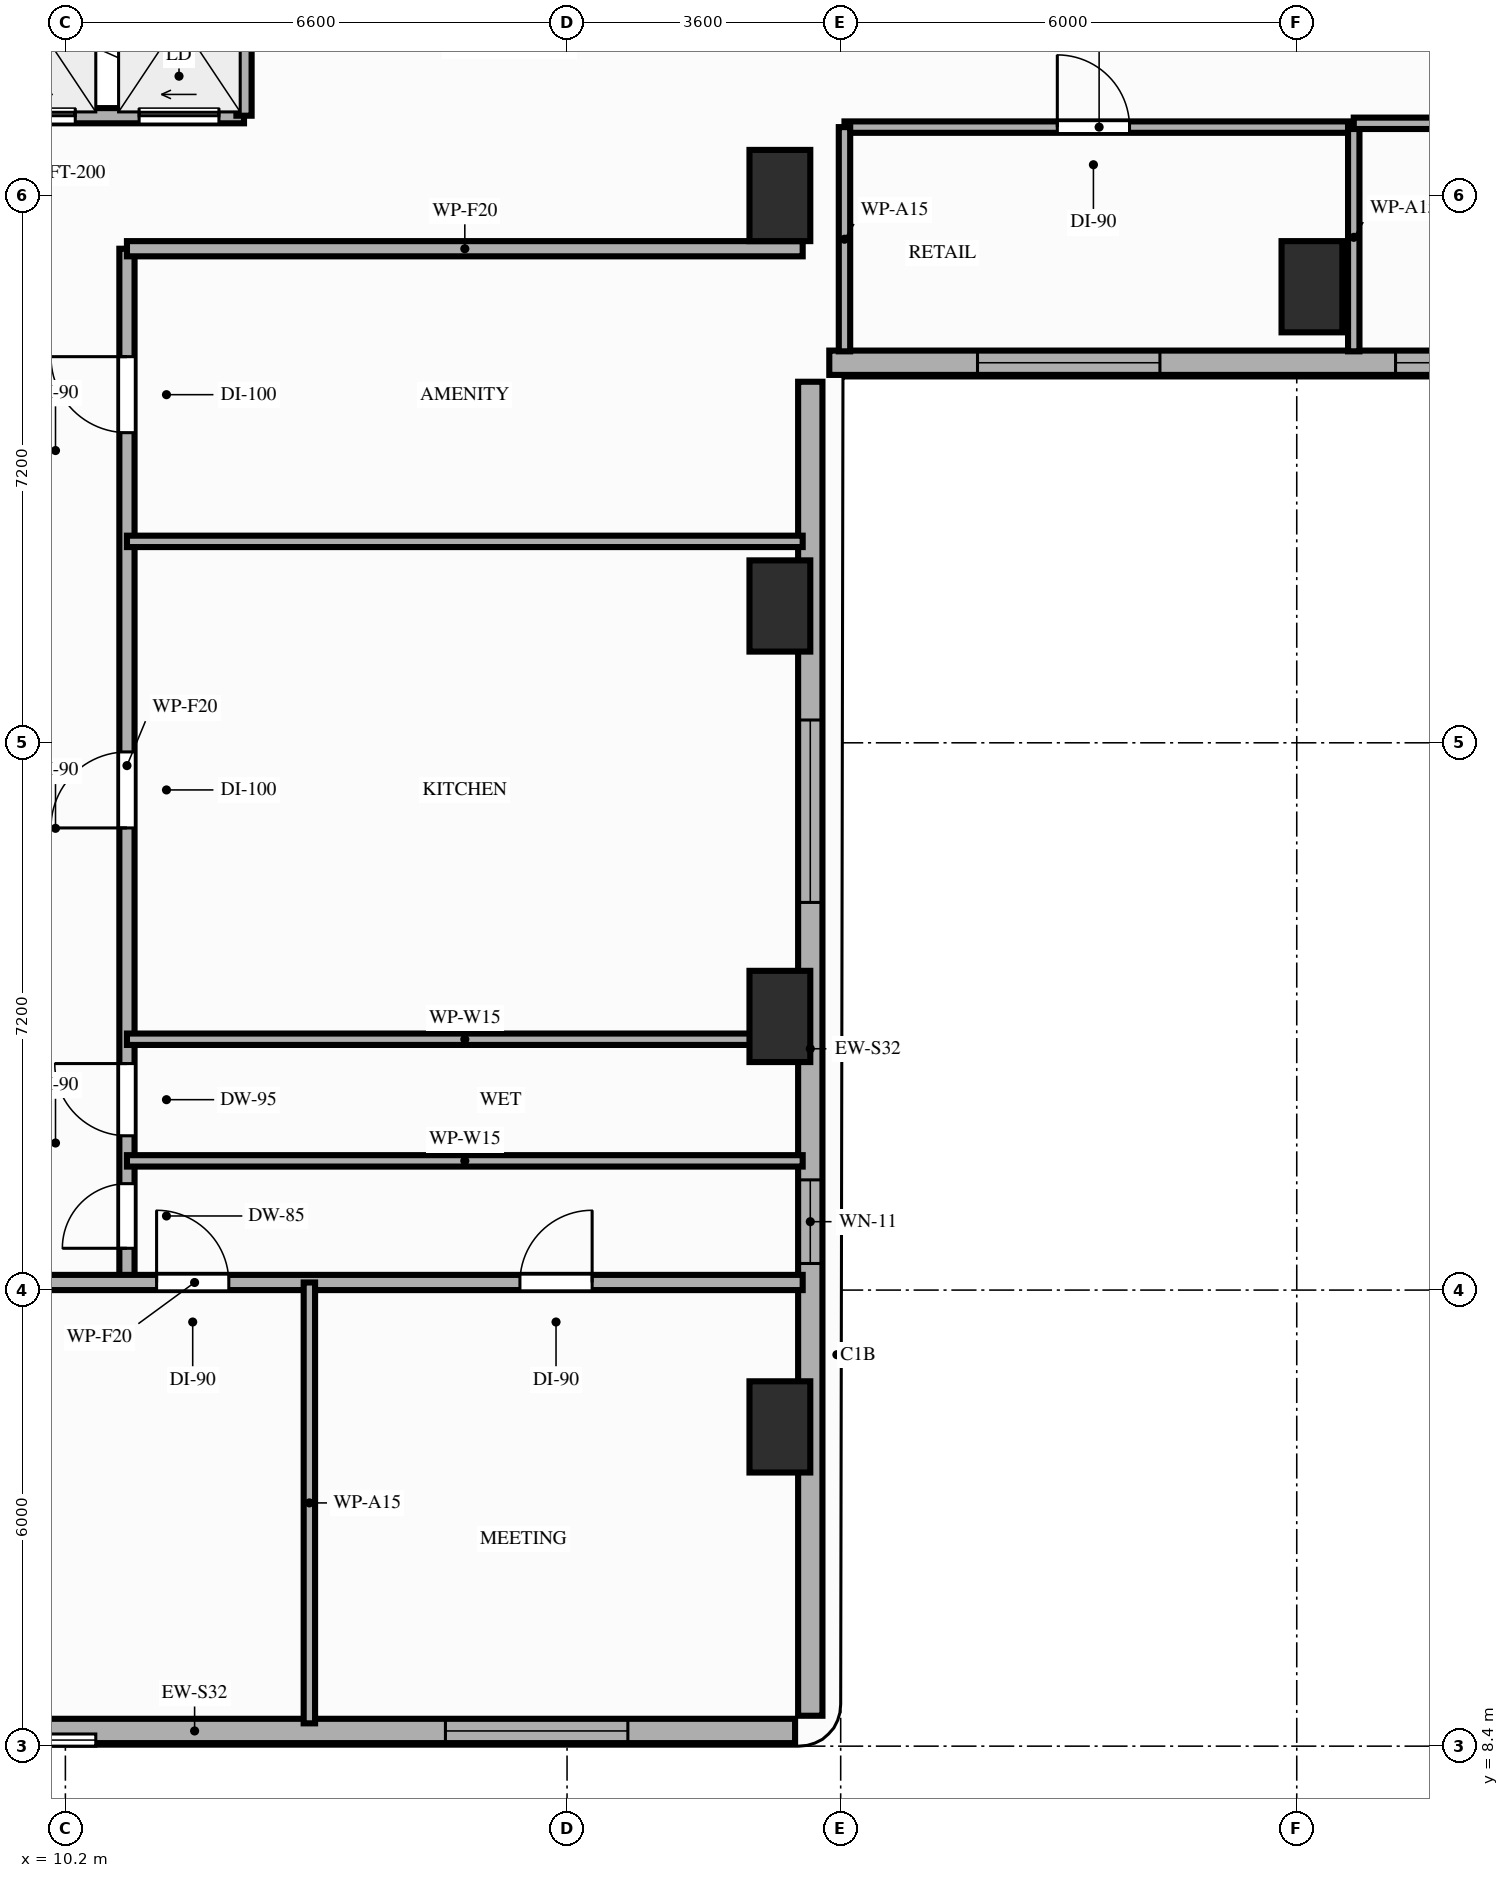
"""IFC4 building model, lengths in metres.
Left out: names, types, materials, properties, quantities, classifications, styles, units other than length and angle.
Written with IfcOpenShell. Run it as: python <this file> out.ifc"""

import sys

from ifc_helpers import new_model, si_unit, direction, frame, frame_2d, origin, origin_2d, place, context, subcontext, project, spatial, rectangle, extrude, element, fill, save


model = new_model("IFC4")
c1 = context("Model", 3, precision=1e-05, world=origin(), true_north=direction((0.0, 1.0)))
c2 = subcontext(c1, "Body", "Model", "MODEL_VIEW")
j1 = project(units=[si_unit("LENGTHUNIT", "METRE"), si_unit("PLANEANGLEUNIT", "RADIAN")], contexts=[c1])
p1 = place(None, origin())
s1 = spatial("IfcSite", under=j1, at=p1, CompositionType="ELEMENT")
p2 = place(p1, origin())
s2 = spatial("IfcBuilding", under=s1, at=p2, CompositionType="ELEMENT")
p3 = place(p2, frame((0.0, 0.0, 75.6)))
s3 = spatial("IfcBuildingStorey", under=s2, at=p3, CompositionType="ELEMENT", Elevation=75.6)
for number, where, z_axis, x_axis in (
    (1, (19.6, 12.6, 0.0), (0.0, 0.0, 1.0), (1.0, 0.0, 0.0)),
    (2, (19.6, 18.0, 0.0), (0.0, 0.0, 1.0), (1.0, 0.0, 0.0)),
    (3, (19.6, 23.4, 0.0), (0.0, 0.0, 1.0), (1.0, 0.0, 0.0)),
    (4, (19.6, 28.8, 0.0), (0.0, 0.0, 1.0), (1.0, 0.0, 0.0)),
    (5, (26.6, 27.6, 0.0), (0.0, 0.0, 1.0), (1.0, 0.0, 0.0)),
):
    element("IfcColumn", number, at=place(p3, frame(where, z_axis=z_axis, x_axis=x_axis)), inside=s3, PredefinedType="COLUMN", context=c2, shape_type="SweptSolid", body=[
        extrude(rectangle(XDim=0.8, YDim=1.2, at=origin_2d()), origin(), (0.0, 0.0, 1.0), 3.8),
    ])
p4 = place(p3, frame((4.0, 8.6, 0.0), z_axis=(0.0, 0.0, 1.0), x_axis=(1.0, 0.0, 0.0)))
e6 = element("IfcWall", 6, at=p4, inside=s3, PredefinedType="STANDARD", context=c2, shape_type="SweptSolid", body=[
    extrude(rectangle(XDim=15.8, YDim=0.32, at=frame_2d((7.9, 0.0))), origin(), (0.0, 0.0, 1.0), 3.56),
])
p5 = place(p4, frame((11.2, 0.0, 0.85)))
e7 = element("IfcOpeningElement", 7, at=p5, cuts=e6, PredefinedType="OPENING", context=c2, shape_type="SweptSolid", body=[
    extrude(rectangle(XDim=2.4, YDim=1.8, at=frame_2d((1.2, 0.9))), frame((0.0, 0.17, 0.0), z_axis=(0.0, -1.0, 0.0), x_axis=(1.0, 0.0, 0.0)), (0.0, 0.0, 1.0), 0.34),
])
p6 = place(p3, frame((20.0, 8.8, 0.0), z_axis=(0.0, 0.0, 1.0), x_axis=(0.0, 1.0, 0.0)))
e8 = element("IfcWall", 8, at=p6, inside=s3, PredefinedType="STANDARD", context=c2, shape_type="SweptSolid", body=[
    extrude(rectangle(XDim=17.55, YDim=0.32, at=frame_2d((8.775, 0.0))), origin(), (0.0, 0.0, 1.0), 2.95),
])
p7 = place(p6, frame((5.95, 0.0, 0.85)))
e9 = element("IfcOpeningElement", 9, at=p7, cuts=e8, PredefinedType="OPENING", context=c2, shape_type="SweptSolid", body=[
    extrude(rectangle(XDim=1.1, YDim=1.7, at=frame_2d((0.55, 0.85))), frame((0.0, 0.17, 0.0), z_axis=(0.0, -1.0, 0.0), x_axis=(1.0, 0.0, 0.0)), (0.0, 0.0, 1.0), 0.34),
])
p8 = place(p6, frame((10.7, 0.0, 0.85)))
e10 = element("IfcOpeningElement", 10, at=p8, cuts=e8, PredefinedType="OPENING", context=c2, shape_type="SweptSolid", body=[
    extrude(rectangle(XDim=2.4, YDim=1.8, at=frame_2d((1.2, 0.9))), frame((0.0, 0.17, 0.0), z_axis=(0.0, -1.0, 0.0), x_axis=(1.0, 0.0, 0.0)), (0.0, 0.0, 1.0), 0.34),
])
p9 = place(p3, frame((20.25, 26.6, 0.0), z_axis=(0.0, 0.0, 1.0), x_axis=(1.0, 0.0, 0.0)))
e11 = element("IfcWall", 11, at=p9, inside=s3, PredefinedType="STANDARD", context=c2, shape_type="SweptSolid", body=[
    extrude(rectangle(XDim=26.15, YDim=0.32, at=frame_2d((13.075, 0.0))), origin(), (0.0, 0.0, 1.0), 3.56),
])
p10 = place(p9, frame((1.95, 0.0, 0.85)))
e12 = element("IfcOpeningElement", 12, at=p10, cuts=e11, PredefinedType="OPENING", context=c2, shape_type="SweptSolid", body=[
    extrude(rectangle(XDim=2.4, YDim=1.8, at=frame_2d((1.2, 0.9))), frame((0.0, 0.17, 0.0), z_axis=(0.0, -1.0, 0.0), x_axis=(1.0, 0.0, 0.0)), (0.0, 0.0, 1.0), 0.34),
])
p11 = place(p9, frame((7.45, 0.0, 0.85)))
e13 = element("IfcOpeningElement", 13, at=p11, cuts=e11, PredefinedType="OPENING", context=c2, shape_type="SweptSolid", body=[
    extrude(rectangle(XDim=2.4, YDim=1.8, at=frame_2d((1.2, 0.9))), frame((0.0, 0.17, 0.0), z_axis=(0.0, -1.0, 0.0), x_axis=(1.0, 0.0, 0.0)), (0.0, 0.0, 1.0), 0.34),
])
p12 = place(p9, frame((21.95, 0.0, 0.85)))
e14 = element("IfcOpeningElement", 14, at=p12, cuts=e11, PredefinedType="OPENING", context=c2, shape_type="SweptSolid", body=[
    extrude(rectangle(XDim=2.4, YDim=1.8, at=frame_2d((1.2, 0.9))), frame((0.0, 0.17, 0.0), z_axis=(0.0, -1.0, 0.0), x_axis=(1.0, 0.0, 0.0)), (0.0, 0.0, 1.0), 0.34),
])
p13 = place(p3, frame((7.0, 29.85, 0.0), z_axis=(0.0, 0.0, 1.0), x_axis=(1.0, 0.0, 0.0)))
e15 = element("IfcWall", 15, at=p13, inside=s3, PredefinedType="MOVABLE", context=c2, shape_type="SweptSolid", body=[
    extrude(rectangle(XDim=5.55, YDim=0.2, at=frame_2d((2.775, 0.0))), origin(), (0.0, 0.0, 1.0), 3.56),
])
p14 = place(p13, frame((0.38, 0.0, 0.0)))
e16 = element("IfcOpeningElement", 16, at=p14, cuts=e15, PredefinedType="OPENING", context=c2, shape_type="SweptSolid", body=[
    extrude(rectangle(XDim=1.05, YDim=2.15, at=frame_2d((0.525, 1.075))), frame((0.0, 0.11, 0.0), z_axis=(0.0, -1.0, 0.0), x_axis=(1.0, 0.0, 0.0)), (0.0, 0.0, 1.0), 0.22),
])
p15 = place(p13, frame((2.28, 0.0, 0.0)))
e17 = element("IfcOpeningElement", 17, at=p15, cuts=e15, PredefinedType="OPENING", context=c2, shape_type="SweptSolid", body=[
    extrude(rectangle(XDim=1.05, YDim=2.15, at=frame_2d((0.525, 1.075))), frame((0.0, 0.11, 0.0), z_axis=(0.0, -1.0, 0.0), x_axis=(1.0, 0.0, 0.0)), (0.0, 0.0, 1.0), 0.22),
])
p16 = place(p13, frame((4.17, 0.0, 0.0)))
e18 = element("IfcOpeningElement", 18, at=p16, cuts=e15, PredefinedType="OPENING", context=c2, shape_type="SweptSolid", body=[
    extrude(rectangle(XDim=1.05, YDim=2.15, at=frame_2d((0.525, 1.075))), frame((0.0, 0.11, 0.0), z_axis=(0.0, -1.0, 0.0), x_axis=(1.0, 0.0, 0.0)), (0.0, 0.0, 1.0), 0.22),
])
p17 = place(p3, frame((12.55, 29.85, 0.0), z_axis=(0.0, 0.0, 1.0), x_axis=(0.0, 1.0, 0.0)))
e19 = element("IfcWall", 19, at=p17, inside=s3, PredefinedType="MOVABLE", context=c2, shape_type="SweptSolid", body=[
    extrude(rectangle(XDim=2.5, YDim=0.2, at=frame_2d((1.25, 0.0))), origin(), (0.0, 0.0, 1.0), 3.56),
])
p18 = place(p3, frame((11.01, 14.5, 0.0), z_axis=(0.0, 0.0, 1.0), x_axis=(0.0, 1.0, 0.0)))
e20 = element("IfcWall", 20, at=p18, inside=s3, PredefinedType="PARTITIONING", context=c2, shape_type="SweptSolid", body=[
    extrude(rectangle(XDim=13.6, YDim=0.2, at=frame_2d((6.8, 0.0))), origin(), (0.0, 0.0, 1.0), 2.95),
])
p19 = place(p18, frame((0.45, 0.0, 0.0)))
e21 = element("IfcOpeningElement", 21, at=p19, cuts=e20, PredefinedType="OPENING", context=c2, shape_type="SweptSolid", body=[
    extrude(rectangle(XDim=0.85, YDim=2.1, at=frame_2d((0.425, 1.05))), frame((0.0, 0.11, 0.0), z_axis=(0.0, -1.0, 0.0), x_axis=(1.0, 0.0, 0.0)), (0.0, 0.0, 1.0), 0.22),
])
p20 = place(p18, frame((1.93, 0.0, 0.0)))
e22 = element("IfcOpeningElement", 22, at=p20, cuts=e20, PredefinedType="OPENING", context=c2, shape_type="SweptSolid", body=[
    extrude(rectangle(XDim=0.95, YDim=2.1, at=frame_2d((0.475, 1.05))), frame((0.0, 0.11, 0.0), z_axis=(0.0, -1.0, 0.0), x_axis=(1.0, 0.0, 0.0)), (0.0, 0.0, 1.0), 0.22),
])
p21 = place(p18, frame((5.98, 0.0, 0.0)))
e23 = element("IfcOpeningElement", 23, at=p21, cuts=e20, PredefinedType="OPENING", context=c2, shape_type="SweptSolid", body=[
    extrude(rectangle(XDim=1.0, YDim=2.15, at=frame_2d((0.5, 1.075))), frame((0.0, 0.11, 0.0), z_axis=(0.0, -1.0, 0.0), x_axis=(1.0, 0.0, 0.0)), (0.0, 0.0, 1.0), 0.22),
])
p22 = place(p18, frame((11.18, 0.0, 0.0)))
e24 = element("IfcOpeningElement", 24, at=p22, cuts=e20, PredefinedType="OPENING", context=c2, shape_type="SweptSolid", body=[
    extrude(rectangle(XDim=1.0, YDim=2.15, at=frame_2d((0.5, 1.075))), frame((0.0, 0.11, 0.0), z_axis=(0.0, -1.0, 0.0), x_axis=(1.0, 0.0, 0.0)), (0.0, 0.0, 1.0), 0.22),
])
p23 = place(p3, frame((3.9, 14.5, 0.0), z_axis=(0.0, 0.0, 1.0), x_axis=(1.0, 0.0, 0.0)))
e25 = element("IfcWall", 25, at=p23, inside=s3, PredefinedType="PARTITIONING", context=c2, shape_type="SweptSolid", body=[
    extrude(rectangle(XDim=16.0, YDim=0.2, at=frame_2d((8.0, 0.0))), origin(), (0.0, 0.0, 1.0), 2.95),
])
p24 = place(p23, frame((7.5, 0.0, 0.0)))
e26 = element("IfcOpeningElement", 26, at=p24, cuts=e25, PredefinedType="OPENING", context=c2, shape_type="SweptSolid", body=[
    extrude(rectangle(XDim=0.95, YDim=2.15, at=frame_2d((0.475, 1.075))), frame((0.0, 0.11, 0.0), z_axis=(0.0, -1.0, 0.0), x_axis=(1.0, 0.0, 0.0)), (0.0, 0.0, 1.0), 0.22),
])
p25 = place(p23, frame((12.28, 0.0, 0.0)))
e27 = element("IfcOpeningElement", 27, at=p25, cuts=e25, PredefinedType="OPENING", context=c2, shape_type="SweptSolid", body=[
    extrude(rectangle(XDim=0.95, YDim=2.15, at=frame_2d((0.475, 1.075))), frame((0.0, 0.11, 0.0), z_axis=(0.0, -1.0, 0.0), x_axis=(1.0, 0.0, 0.0)), (0.0, 0.0, 1.0), 0.22),
])
p26 = place(p3, frame((11.01, 28.1, 0.0), z_axis=(0.0, 0.0, 1.0), x_axis=(1.0, 0.0, 0.0)))
e28 = element("IfcWall", 28, at=p26, inside=s3, PredefinedType="PARTITIONING", context=c2, shape_type="SweptSolid", body=[
    extrude(rectangle(XDim=8.89, YDim=0.2, at=frame_2d((4.445, 0.0))), origin(), (0.0, 0.0, 1.0), 2.95),
])
p27 = place(p3, frame((20.45, 29.7, 0.0), z_axis=(0.0, 0.0, 1.0), x_axis=(1.0, 0.0, 0.0)))
e29 = element("IfcWall", 29, at=p27, inside=s3, PredefinedType="PARTITIONING", context=c2, shape_type="SweptSolid", body=[
    extrude(rectangle(XDim=6.7, YDim=0.15, at=frame_2d((3.35, 0.0))), origin(), (0.0, 0.0, 1.0), 3.56),
])
p28 = place(p27, frame((2.8, 0.0, 0.0)))
e30 = element("IfcOpeningElement", 30, at=p28, cuts=e29, PredefinedType="OPENING", context=c2, shape_type="SweptSolid", body=[
    extrude(rectangle(XDim=0.95, YDim=2.15, at=frame_2d((0.475, 1.075))), frame((0.0, 0.085, 0.0), z_axis=(0.0, -1.0, 0.0), x_axis=(1.0, 0.0, 0.0)), (0.0, 0.0, 1.0), 0.17),
])
p29 = place(p3, frame((20.45, 26.75, 0.0), z_axis=(0.0, 0.0, 1.0), x_axis=(0.0, 1.0, 0.0)))
e31 = element("IfcWall", 31, at=p29, inside=s3, PredefinedType="PARTITIONING", context=c2, shape_type="SweptSolid", body=[
    extrude(rectangle(XDim=2.95, YDim=0.15, at=frame_2d((1.475, 0.0))), origin(), (0.0, 0.0, 1.0), 2.95),
])
p30 = place(p3, frame((27.15, 26.75, 0.0), z_axis=(0.0, 0.0, 1.0), x_axis=(0.0, 1.0, 0.0)))
e32 = element("IfcWall", 32, at=p30, inside=s3, PredefinedType="PARTITIONING", context=c2, shape_type="SweptSolid", body=[
    extrude(rectangle(XDim=3.0, YDim=0.15, at=frame_2d((1.5, 0.0))), origin(), (0.0, 0.0, 1.0), 2.95),
])
p31 = place(p3, frame((13.41, 8.7, 0.0), z_axis=(0.0, 0.0, 1.0), x_axis=(0.0, 1.0, 0.0)))
e33 = element("IfcWall", 33, at=p31, inside=s3, PredefinedType="PARTITIONING", context=c2, shape_type="SweptSolid", body=[
    extrude(rectangle(XDim=5.8, YDim=0.15, at=frame_2d((2.9, 0.0))), origin(), (0.0, 0.0, 1.0), 2.95),
])
for number, where, z_axis, x_axis in (
    (34, (11.01, 16.1, 0.0), (0.0, 0.0, 1.0), (1.0, 0.0, 0.0)),
    (35, (11.01, 17.7, 0.0), (0.0, 0.0, 1.0), (1.0, 0.0, 0.0)),
    (36, (11.01, 24.25, 0.0), (0.0, 0.0, 1.0), (1.0, 0.0, 0.0)),
):
    element("IfcWall", number, at=place(p3, frame(where, z_axis=z_axis, x_axis=x_axis)), inside=s3, PredefinedType="PARTITIONING", context=c2, shape_type="SweptSolid", body=[
        extrude(rectangle(XDim=8.89, YDim=0.15, at=frame_2d((4.445, 0.0))), origin(), (0.0, 0.0, 1.0), 2.95),
    ])
p32 = place(p3, frame((27.15, 29.75, 0.0), z_axis=(0.0, 0.0, 1.0), x_axis=(1.0, 0.0, 0.0)))
e37 = element("IfcWall", 37, at=p32, inside=s3, PredefinedType="PARTITIONING", context=c2, shape_type="SweptSolid", body=[
    extrude(rectangle(XDim=13.45, YDim=0.15, at=frame_2d((6.725, 0.0))), origin(), (0.0, 0.0, 1.0), 2.95),
])
p33 = place(p32, frame((6.25, 0.0, 0.0)))
e38 = element("IfcOpeningElement", 38, at=p33, cuts=e37, PredefinedType="OPENING", context=c2, shape_type="SweptSolid", body=[
    extrude(rectangle(XDim=0.95, YDim=2.15, at=frame_2d((0.475, 1.075))), frame((0.0, 0.085, 0.0), z_axis=(0.0, -1.0, 0.0), x_axis=(1.0, 0.0, 0.0)), (0.0, 0.0, 1.0), 0.17),
])
p34 = place(p7, origin())
e39 = element("IfcWindow", 39, at=p34, inside=s3, PartitioningType="SINGLE_PANEL", PredefinedType="WINDOW", context=c2, shape_type="SweptSolid", body=[
    extrude(rectangle(XDim=1.1, YDim=1.7, at=frame_2d((0.55, 0.85))), frame((0.0, 0.03, 0.0), z_axis=(0.0, -1.0, 0.0), x_axis=(1.0, 0.0, 0.0)), (0.0, 0.0, 1.0), 0.06),
])
fill(e9, e39)
p35 = place(p8, origin())
e40 = element("IfcWindow", 40, at=p35, inside=s3, PartitioningType="SINGLE_PANEL", PredefinedType="WINDOW", context=c2, shape_type="SweptSolid", body=[
    extrude(rectangle(XDim=2.4, YDim=1.8, at=frame_2d((1.2, 0.9))), frame((0.0, 0.03, 0.0), z_axis=(0.0, -1.0, 0.0), x_axis=(1.0, 0.0, 0.0)), (0.0, 0.0, 1.0), 0.06),
])
fill(e10, e40)
p36 = place(p5, origin())
e41 = element("IfcWindow", 41, at=p36, inside=s3, PartitioningType="SINGLE_PANEL", PredefinedType="WINDOW", context=c2, shape_type="SweptSolid", body=[
    extrude(rectangle(XDim=2.4, YDim=1.8, at=frame_2d((1.2, 0.9))), frame((0.0, 0.03, 0.0), z_axis=(0.0, -1.0, 0.0), x_axis=(1.0, 0.0, 0.0)), (0.0, 0.0, 1.0), 0.06),
])
fill(e7, e41)
p37 = place(p10, origin())
e42 = element("IfcWindow", 42, at=p37, inside=s3, PartitioningType="SINGLE_PANEL", PredefinedType="WINDOW", context=c2, shape_type="SweptSolid", body=[
    extrude(rectangle(XDim=2.4, YDim=1.8, at=frame_2d((1.2, 0.9))), frame((0.0, 0.03, 0.0), z_axis=(0.0, -1.0, 0.0), x_axis=(1.0, 0.0, 0.0)), (0.0, 0.0, 1.0), 0.06),
])
fill(e12, e42)
p38 = place(p11, origin())
e43 = element("IfcWindow", 43, at=p38, inside=s3, PartitioningType="SINGLE_PANEL", PredefinedType="WINDOW", context=c2, shape_type="SweptSolid", body=[
    extrude(rectangle(XDim=2.4, YDim=1.8, at=frame_2d((1.2, 0.9))), frame((0.0, 0.03, 0.0), z_axis=(0.0, -1.0, 0.0), x_axis=(1.0, 0.0, 0.0)), (0.0, 0.0, 1.0), 0.06),
])
fill(e13, e43)
p39 = place(p15, origin())
e44 = element("IfcDoor", 44, at=p39, inside=s3, OperationType="SLIDING_TO_LEFT", PredefinedType="DOOR", context=c2, shape_type="SweptSolid", body=[
    extrude(rectangle(XDim=1.05, YDim=2.15, at=frame_2d((0.525, 1.075))), frame((0.0, 0.025, 0.0), z_axis=(0.0, -1.0, 0.0), x_axis=(1.0, 0.0, 0.0)), (0.0, 0.0, 1.0), 0.05),
])
fill(e17, e44)
p40 = place(p16, origin())
e45 = element("IfcDoor", 45, at=p40, inside=s3, OperationType="SLIDING_TO_LEFT", PredefinedType="DOOR", context=c2, shape_type="SweptSolid", body=[
    extrude(rectangle(XDim=1.05, YDim=2.15, at=frame_2d((0.525, 1.075))), frame((0.0, 0.025, 0.0), z_axis=(0.0, -1.0, 0.0), x_axis=(1.0, 0.0, 0.0)), (0.0, 0.0, 1.0), 0.05),
])
fill(e18, e45)
p41 = place(p28, origin())
e46 = element("IfcDoor", 46, at=p41, inside=s3, OperationType="SINGLE_SWING_LEFT", PredefinedType="DOOR", context=c2, shape_type="SweptSolid", body=[
    extrude(rectangle(XDim=0.95, YDim=2.15, at=frame_2d((0.475, 1.075))), frame((0.0, 0.025, 0.0), z_axis=(0.0, -1.0, 0.0), x_axis=(1.0, 0.0, 0.0)), (0.0, 0.0, 1.0), 0.05),
])
fill(e30, e46)
p42 = place(p24, origin())
e47 = element("IfcDoor", 47, at=p42, inside=s3, OperationType="SINGLE_SWING_LEFT", PredefinedType="DOOR", context=c2, shape_type="SweptSolid", body=[
    extrude(rectangle(XDim=0.95, YDim=2.15, at=frame_2d((0.475, 1.075))), frame((0.0, 0.025, 0.0), z_axis=(0.0, -1.0, 0.0), x_axis=(1.0, 0.0, 0.0)), (0.0, 0.0, 1.0), 0.05),
])
fill(e26, e47)
p43 = place(p25, origin())
e48 = element("IfcDoor", 48, at=p43, inside=s3, OperationType="SINGLE_SWING_RIGHT", PredefinedType="DOOR", context=c2, shape_type="SweptSolid", body=[
    extrude(rectangle(XDim=0.95, YDim=2.15, at=frame_2d((0.475, 1.075))), frame((0.0, 0.025, 0.0), z_axis=(0.0, -1.0, 0.0), x_axis=(1.0, 0.0, 0.0)), (0.0, 0.0, 1.0), 0.05),
])
fill(e27, e48)
p44 = place(p19, origin())
e49 = element("IfcDoor", 49, at=p44, inside=s3, OperationType="SINGLE_SWING_LEFT", PredefinedType="DOOR", context=c2, shape_type="SweptSolid", body=[
    extrude(rectangle(XDim=0.85, YDim=2.1, at=frame_2d((0.425, 1.05))), frame((0.0, 0.025, 0.0), z_axis=(0.0, -1.0, 0.0), x_axis=(1.0, 0.0, 0.0)), (0.0, 0.0, 1.0), 0.05),
])
fill(e21, e49)
p45 = place(p20, origin())
e50 = element("IfcDoor", 50, at=p45, inside=s3, OperationType="SINGLE_SWING_RIGHT", PredefinedType="DOOR", context=c2, shape_type="SweptSolid", body=[
    extrude(rectangle(XDim=0.95, YDim=2.1, at=frame_2d((0.475, 1.05))), frame((0.0, 0.025, 0.0), z_axis=(0.0, -1.0, 0.0), x_axis=(1.0, 0.0, 0.0)), (0.0, 0.0, 1.0), 0.05),
])
fill(e22, e50)
p46 = place(p21, origin())
e51 = element("IfcDoor", 51, at=p46, inside=s3, OperationType="SINGLE_SWING_LEFT", PredefinedType="DOOR", context=c2, shape_type="SweptSolid", body=[
    extrude(rectangle(XDim=1.0, YDim=2.15, at=frame_2d((0.5, 1.075))), frame((0.0, 0.025, 0.0), z_axis=(0.0, -1.0, 0.0), x_axis=(1.0, 0.0, 0.0)), (0.0, 0.0, 1.0), 0.05),
])
fill(e23, e51)
p47 = place(p22, origin())
e52 = element("IfcDoor", 52, at=p47, inside=s3, OperationType="SINGLE_SWING_RIGHT", PredefinedType="DOOR", context=c2, shape_type="SweptSolid", body=[
    extrude(rectangle(XDim=1.0, YDim=2.15, at=frame_2d((0.5, 1.075))), frame((0.0, 0.025, 0.0), z_axis=(0.0, -1.0, 0.0), x_axis=(1.0, 0.0, 0.0)), (0.0, 0.0, 1.0), 0.05),
])
fill(e24, e52)
save(model, sys.argv[1])
